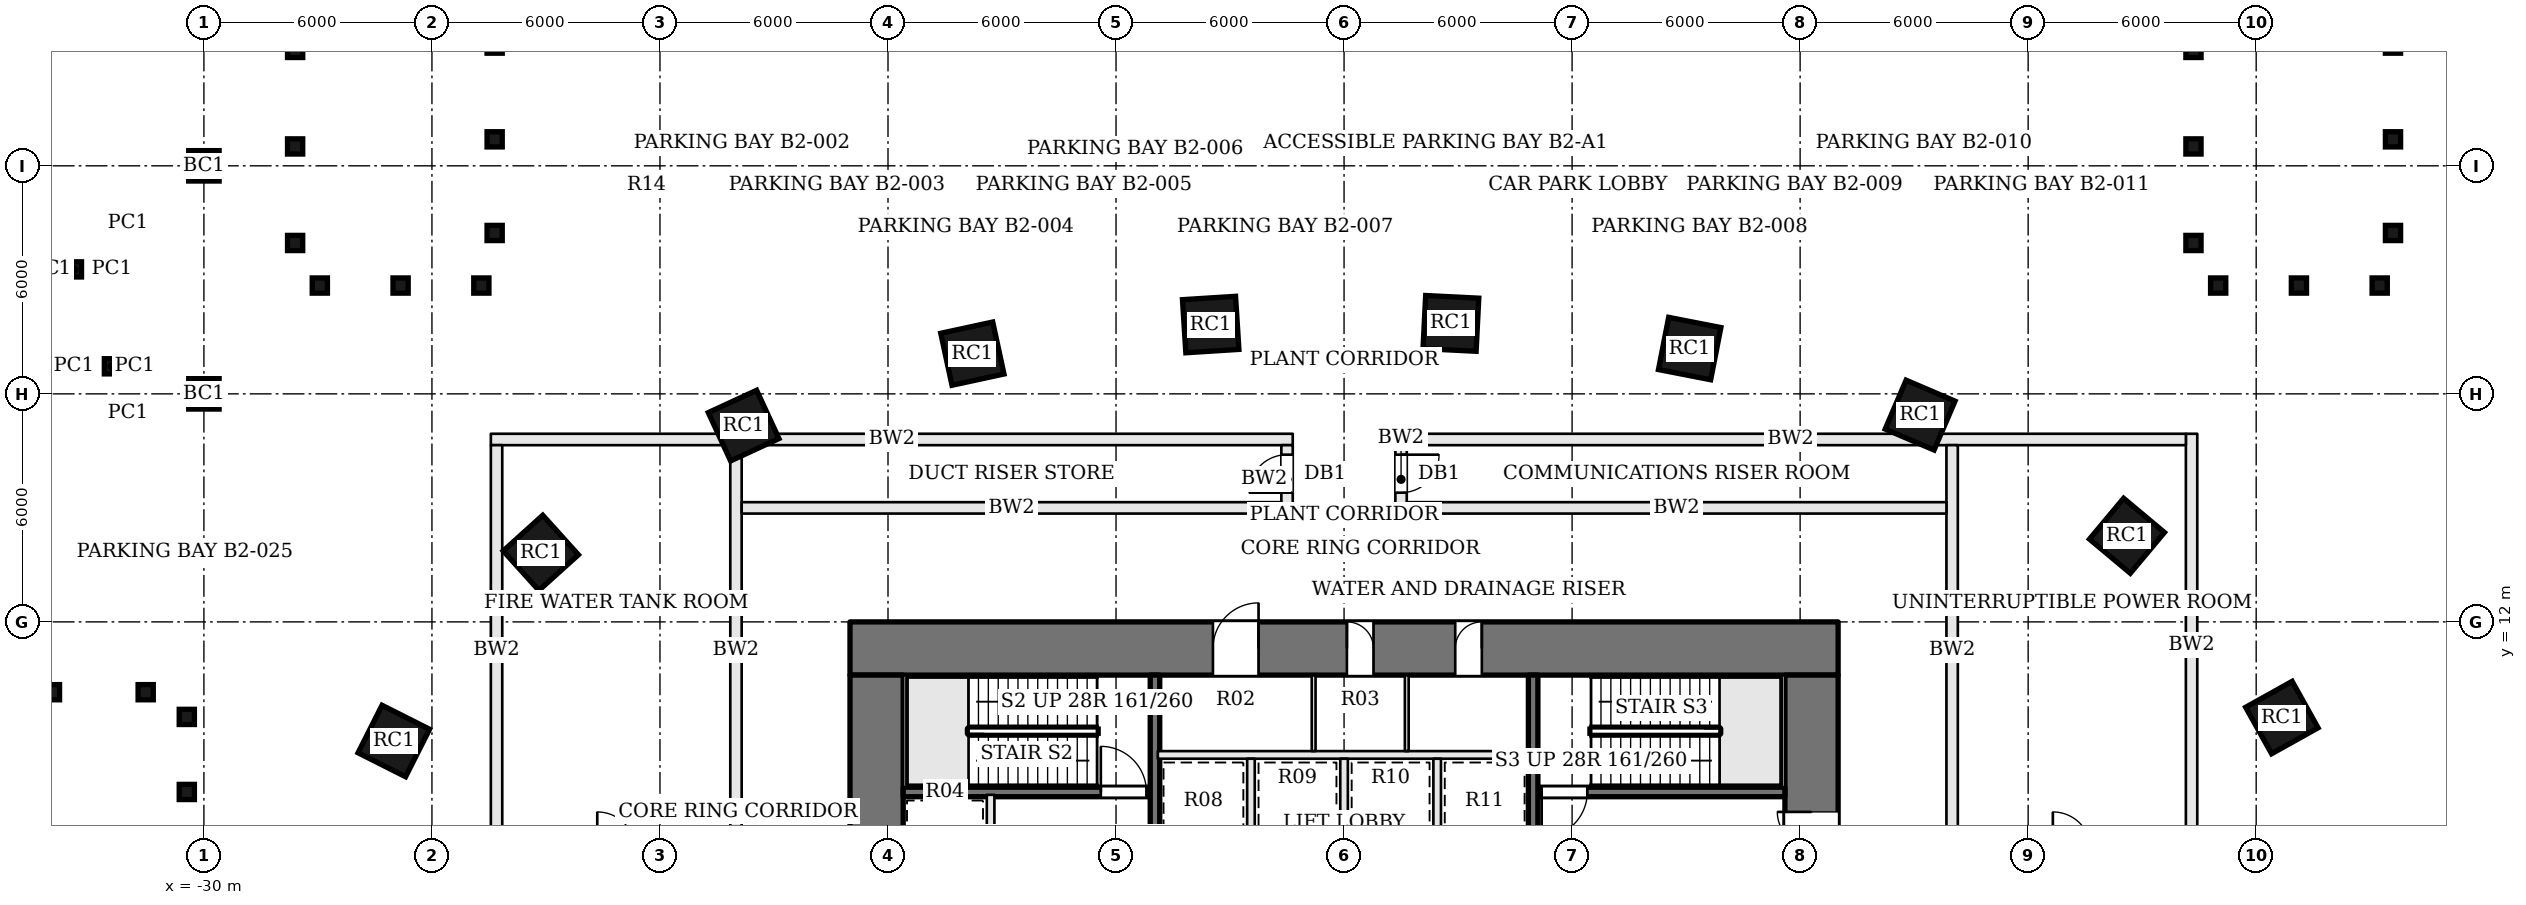
"""IFC4 building model, lengths in metres.
Left out: names, types, materials, properties, quantities, classifications, styles, units other than length and angle.
Written with IfcOpenShell. Run it as: python <this file> out.ifc"""

import sys

from ifc_helpers import new_model, si_unit, direction, frame, frame_2d, origin, origin_2d, place, context, subcontext, project, spatial, rectangle, extrude, element, fill, save


model = new_model("IFC4")
c1 = context("Model", 3, precision=1e-05, world=origin(), true_north=direction((0.0, 1.0)))
c2 = subcontext(c1, "Body", "Model", "MODEL_VIEW")
j1 = project(units=[si_unit("LENGTHUNIT", "METRE"), si_unit("PLANEANGLEUNIT", "RADIAN")], contexts=[c1])
p1 = place(None, origin())
s1 = spatial("IfcSite", under=j1, at=p1, CompositionType="ELEMENT")
p2 = place(p1, origin())
s2 = spatial("IfcBuilding", under=s1, at=p2, CompositionType="ELEMENT")
p3 = place(p2, frame((0.0, 0.0, -10.5)))
s3 = spatial("IfcBuildingStorey", under=s2, at=p3, CompositionType="ELEMENT", Elevation=-10.5)
for number, where, z_axis, x_axis in (
    (1, (-30.0, 18.0, 0.0), (0.0, 0.0, 1.0), (1.0, 0.0, 0.0)),
    (2, (-30.0, 24.0, 0.0), (0.0, 0.0, 1.0), (1.0, 0.0, 0.0)),
):
    element("IfcColumn", number, at=place(p3, frame(where, z_axis=z_axis, x_axis=x_axis)), inside=s3, PredefinedType="COLUMN", context=c2, shape_type="SweptSolid", body=[
        extrude(rectangle(XDim=0.8, YDim=0.8, at=origin_2d()), origin(), (0.0, 0.0, 1.0), 4.5),
    ])
p4 = place(p3, frame((-13.0, 11.3, 0.0), z_axis=(0.0, 0.0, 1.0), x_axis=(1.0, 0.0, 0.0)))
e3 = element("IfcWall", 3, at=p4, inside=s3, PredefinedType="SHEAR", context=c2, shape_type="SweptSolid", body=[
    extrude(rectangle(XDim=26.0, YDim=1.4, at=frame_2d((13.0, 0.0))), origin(), (0.0, 0.0, 1.0), 4.5),
])
p5 = place(p4, frame((9.55, 0.0, 0.0)))
e4 = element("IfcOpeningElement", 4, at=p5, cuts=e3, PredefinedType="OPENING", context=c2, shape_type="SweptSolid", body=[
    extrude(rectangle(XDim=1.2, YDim=2.1, at=frame_2d((0.6, 1.05))), frame((0.0, 0.71, 0.0), z_axis=(0.0, -1.0, 0.0), x_axis=(1.0, 0.0, 0.0)), (0.0, 0.0, 1.0), 1.42),
])
p6 = place(p4, frame((13.075, 0.0, 0.0)))
e5 = element("IfcOpeningElement", 5, at=p6, cuts=e3, PredefinedType="OPENING", context=c2, shape_type="SweptSolid", body=[
    extrude(rectangle(XDim=0.7, YDim=2.1, at=frame_2d((0.35, 1.05))), frame((0.0, 0.71, 0.0), z_axis=(0.0, -1.0, 0.0), x_axis=(1.0, 0.0, 0.0)), (0.0, 0.0, 1.0), 1.42),
])
p7 = place(p4, frame((15.925, 0.0, 0.0)))
e6 = element("IfcOpeningElement", 6, at=p7, cuts=e3, PredefinedType="OPENING", context=c2, shape_type="SweptSolid", body=[
    extrude(rectangle(XDim=0.7, YDim=2.1, at=frame_2d((0.35, 1.05))), frame((0.0, 0.71, 0.0), z_axis=(0.0, -1.0, 0.0), x_axis=(1.0, 0.0, 0.0)), (0.0, 0.0, 1.0), 1.42),
])
p8 = place(p3, frame((12.3, -1.6, 0.0), z_axis=(0.0, 0.0, 1.0), x_axis=(0.0, 1.0, 0.0)))
e7 = element("IfcWall", 7, at=p8, inside=s3, PredefinedType="SHEAR", context=c2, shape_type="SweptSolid", body=[
    extrude(rectangle(XDim=12.2, YDim=1.4, at=frame_2d((6.1, 0.0))), origin(), (0.0, 0.0, 1.0), 4.5),
])
p9 = place(p8, frame((6.8, 0.0, 0.0)))
e8 = element("IfcOpeningElement", 8, at=p9, cuts=e7, PredefinedType="OPENING", context=c2, shape_type="SweptSolid", body=[
    extrude(rectangle(XDim=1.8, YDim=2.1, at=frame_2d((0.9, 1.05))), frame((0.0, 0.71, 0.0), z_axis=(0.0, -1.0, 0.0), x_axis=(1.0, 0.0, 0.0)), (0.0, 0.0, 1.0), 1.42),
])
p10 = place(p3, frame((-12.3, -1.6, 0.0), z_axis=(0.0, 0.0, 1.0), x_axis=(0.0, 1.0, 0.0)))
e9 = element("IfcWall", 9, at=p10, inside=s3, PredefinedType="SHEAR", context=c2, shape_type="SweptSolid", body=[
    extrude(rectangle(XDim=12.2, YDim=1.4, at=frame_2d((6.1, 0.0))), origin(), (0.0, 0.0, 1.0), 4.5),
])
p11 = place(p10, frame((3.6, 0.0, 0.0)))
e10 = element("IfcOpeningElement", 10, at=p11, cuts=e9, PredefinedType="OPENING", context=c2, shape_type="SweptSolid", body=[
    extrude(rectangle(XDim=1.8, YDim=2.1, at=frame_2d((0.9, 1.05))), frame((0.0, 0.71, 0.0), z_axis=(0.0, -1.0, 0.0), x_axis=(1.0, 0.0, 0.0)), (0.0, 0.0, 1.0), 1.42),
])
for number, where, z_axis, x_axis in (
    (11, (24.676, 9.483, 0.0), (0.0, 0.0, 1.0), (-0.487, 0.873, 0.0)),
    (12, (20.6, 14.266, 0.0), (0.0, 0.0, 1.0), (-0.767, 0.641, 0.0)),
    (13, (15.157, 17.441, 0.0), (0.0, 0.0, 1.0), (-0.919, 0.394, 0.0)),
    (14, (9.094, 19.192, 0.0), (0.0, 0.0, 1.0), (-0.981, 0.192, 0.0)),
    (15, (2.811, 19.854, 0.0), (0.0, 0.0, 1.0), (-0.999, 0.05, 0.0)),
    (16, (-3.509, 19.824, 0.0), (0.0, 0.0, 1.0), (-0.998, -0.063, 0.0)),
    (17, (-9.78, 19.058, 0.0), (0.0, 0.0, 1.0), (-0.977, -0.211, 0.0)),
    (18, (-15.799, 17.165, 0.0), (0.0, 0.0, 1.0), (-0.908, -0.419, 0.0)),
    (19, (-21.135, 13.817, 0.0), (0.0, 0.0, 1.0), (-0.743, -0.67, 0.0)),
    (20, (-25.003, 8.866, 0.0), (0.0, 0.0, 1.0), (-0.45, -0.893, 0.0)),
):
    element("IfcColumn", number, at=place(p3, frame(where, z_axis=z_axis, x_axis=x_axis)), inside=s3, PredefinedType="COLUMN", context=c2, shape_type="SweptSolid", body=[
        extrude(rectangle(XDim=1.4, YDim=1.4, at=origin_2d()), origin(), (0.0, 0.0, 1.0), 4.5),
    ])
for number, where, z_axis, x_axis in (
    (21, (-32.0, 17.5, 0.0), (0.0, 0.0, 1.0), (1.0, 0.0, 0.0)),
    (22, (-32.0, 22.5, 0.0), (0.0, 0.0, 1.0), (1.0, 0.0, 0.0)),
    (23, (-33.42, 18.725, 0.0), (0.0, 0.0, 1.0), (1.0, 0.0, 0.0)),
    (24, (-32.42, 18.725, 0.0), (0.0, 0.0, 1.0), (1.0, 0.0, 0.0)),
    (25, (-32.42, 21.275, 0.0), (0.0, 0.0, 1.0), (1.0, 0.0, 0.0)),
    (26, (-33.42, 21.275, 0.0), (0.0, 0.0, 1.0), (1.0, 0.0, 0.0)),
):
    element("IfcColumn", number, at=place(p3, frame(where, z_axis=z_axis, x_axis=x_axis)), inside=s3, PredefinedType="COLUMN", context=c2, shape_type="SweptSolid", body=[
        extrude(rectangle(XDim=0.4, YDim=0.4, at=origin_2d()), origin(), (0.0, 0.0, 1.0), 4.5),
    ])
p12 = place(p3, frame((11.6, 7.525, 0.0), z_axis=(0.0, 0.0, 1.0), x_axis=(-1.0, 0.0, 0.0)))
e27 = element("IfcWall", 27, at=p12, inside=s3, PredefinedType="SOLIDWALL", context=c2, shape_type="SweptSolid", body=[
    extrude(rectangle(XDim=6.5, YDim=0.25, at=frame_2d((3.25, 0.0))), origin(), (0.0, 0.0, 1.0), 4.2),
])
p13 = place(p12, frame((5.2, 0.0, 0.0)))
e28 = element("IfcOpeningElement", 28, at=p13, cuts=e27, PredefinedType="OPENING", context=c2, shape_type="SweptSolid", body=[
    extrude(rectangle(XDim=1.2, YDim=2.1, at=frame_2d((0.6, 1.05))), frame((0.0, 0.135, 0.0), z_axis=(0.0, -1.0, 0.0), x_axis=(1.0, 0.0, 0.0)), (0.0, 0.0, 1.0), 0.27),
])
p14 = place(p3, frame((-11.6, 7.525, 0.0), z_axis=(0.0, 0.0, 1.0), x_axis=(1.0, 0.0, 0.0)))
e29 = element("IfcWall", 29, at=p14, inside=s3, PredefinedType="SOLIDWALL", context=c2, shape_type="SweptSolid", body=[
    extrude(rectangle(XDim=6.5, YDim=0.25, at=frame_2d((3.25, 0.0))), origin(), (0.0, 0.0, 1.0), 4.2),
])
p15 = place(p14, frame((5.2, 0.0, 0.0)))
e30 = element("IfcOpeningElement", 30, at=p15, cuts=e29, PredefinedType="OPENING", context=c2, shape_type="SweptSolid", body=[
    extrude(rectangle(XDim=1.2, YDim=2.1, at=frame_2d((0.6, 1.05))), frame((0.0, 0.135, 0.0), z_axis=(0.0, -1.0, 0.0), x_axis=(1.0, 0.0, 0.0)), (0.0, 0.0, 1.0), 0.27),
])
p16 = place(p3, frame((-9.3, 4.45, 0.0), z_axis=(0.0, 0.0, 1.0), x_axis=(0.0, 1.0, 0.0)))
e31 = element("IfcWall", 31, at=p16, inside=s3, PredefinedType="SOLIDWALL", context=c2, shape_type="SweptSolid", body=[
    extrude(rectangle(XDim=3.0, YDim=0.2, at=frame_2d((1.5, 0.0))), origin(), (0.0, 0.0, 1.0), 4.2),
])
p17 = place(p3, frame((-4.975, -1.6, 0.0), z_axis=(0.0, 0.0, 1.0), x_axis=(0.0, 1.0, 0.0)))
e32 = element("IfcWall", 32, at=p17, inside=s3, PredefinedType="SOLIDWALL", context=c2, shape_type="SweptSolid", body=[
    extrude(rectangle(XDim=12.2, YDim=0.25, at=frame_2d((6.1, 0.0))), origin(), (0.0, 0.0, 1.0), 4.2),
])
p18 = place(p17, frame((4.65, 0.0, 0.0)))
e33 = element("IfcOpeningElement", 33, at=p18, cuts=e32, PredefinedType="OPENING", context=c2, shape_type="SweptSolid", body=[
    extrude(rectangle(XDim=1.2, YDim=2.1, at=frame_2d((0.6, 1.05))), frame((0.0, 0.135, 0.0), z_axis=(0.0, -1.0, 0.0), x_axis=(1.0, 0.0, 0.0)), (0.0, 0.0, 1.0), 0.27),
])
p19 = place(p3, frame((4.975, 10.6, 0.0), z_axis=(0.0, 0.0, 1.0), x_axis=(0.0, -1.0, 0.0)))
e34 = element("IfcWall", 34, at=p19, inside=s3, PredefinedType="SOLIDWALL", context=c2, shape_type="SweptSolid", body=[
    extrude(rectangle(XDim=12.2, YDim=0.25, at=frame_2d((6.1, 0.0))), origin(), (0.0, 0.0, 1.0), 4.2),
])
p20 = place(p19, frame((4.65, 0.0, 0.0)))
e35 = element("IfcOpeningElement", 35, at=p20, cuts=e34, PredefinedType="OPENING", context=c2, shape_type="SweptSolid", body=[
    extrude(rectangle(XDim=1.2, YDim=2.1, at=frame_2d((0.6, 1.05))), frame((0.0, 0.135, 0.0), z_axis=(0.0, -1.0, 0.0), x_axis=(1.0, 0.0, 0.0)), (0.0, 0.0, 1.0), 0.27),
])
p21 = place(p3, frame((-4.9, 8.5, 0.0), z_axis=(0.0, 0.0, 1.0), x_axis=(1.0, 0.0, 0.0)))
e36 = element("IfcWall", 36, at=p21, inside=s3, PredefinedType="SOLIDWALL", context=c2, shape_type="SweptSolid", body=[
    extrude(rectangle(XDim=9.8, YDim=0.2, at=frame_2d((4.9, 0.0))), origin(), (0.0, 0.0, 1.0), 4.2),
])
for number, where, z_axis, x_axis in (
    (37, (-2.45, 6.2, 0.0), (0.0, 0.0, 1.0), (0.0, 1.0, 0.0)),
    (38, (0.0, 6.2, 0.0), (0.0, 0.0, 1.0), (0.0, 1.0, 0.0)),
    (39, (2.45, 6.2, 0.0), (0.0, 0.0, 1.0), (0.0, 1.0, 0.0)),
):
    element("IfcWall", number, at=place(p3, frame(where, z_axis=z_axis, x_axis=x_axis)), inside=s3, PredefinedType="SOLIDWALL", context=c2, shape_type="SweptSolid", body=[
        extrude(rectangle(XDim=2.2, YDim=0.2, at=frame_2d((1.1, 0.0))), origin(), (0.0, 0.0, 1.0), 4.2),
    ])
for number, where, z_axis, x_axis in (
    (40, (-0.8, 8.6, 0.0), (0.0, 0.0, 1.0), (0.0, 1.0, 0.0)),
    (41, (1.65, 8.6, 0.0), (0.0, 0.0, 1.0), (0.0, 1.0, 0.0)),
):
    element("IfcWall", number, at=place(p3, frame(where, z_axis=z_axis, x_axis=x_axis)), inside=s3, PredefinedType="PARTITIONING", context=c2, shape_type="SweptSolid", body=[
        extrude(rectangle(XDim=2.0, YDim=0.1, at=frame_2d((1.0, 0.0))), origin(), (0.0, 0.0, 1.0), 4.2),
    ])
p22 = place(p3, frame((-16.0, 5.85, 0.0), z_axis=(0.0, 0.0, 1.0), x_axis=(0.0, 1.0, 0.0)))
e42 = element("IfcWall", 42, at=p22, inside=s3, PredefinedType="SOLIDWALL", context=c2, shape_type="SweptSolid", body=[
    extrude(rectangle(XDim=10.8, YDim=0.3, at=frame_2d((5.4, 0.0))), origin(), (0.0, 0.0, 1.0), 3.48),
])
p23 = place(p3, frame((-1.35, 16.8, 0.0), z_axis=(0.0, 0.0, 1.0), x_axis=(-1.0, 0.0, 0.0)))
e43 = element("IfcWall", 43, at=p23, inside=s3, PredefinedType="SOLIDWALL", context=c2, shape_type="SweptSolid", body=[
    extrude(rectangle(XDim=21.1, YDim=0.3, at=frame_2d((10.55, 0.0))), origin(), (0.0, 0.0, 1.0), 3.48),
])
p24 = place(p3, frame((-22.3, 16.65, 0.0), z_axis=(0.0, 0.0, 1.0), x_axis=(0.0, -1.0, 0.0)))
e44 = element("IfcWall", 44, at=p24, inside=s3, PredefinedType="SOLIDWALL", context=c2, shape_type="SweptSolid", body=[
    extrude(rectangle(XDim=10.8, YDim=0.3, at=frame_2d((5.4, 0.0))), origin(), (0.0, 0.0, 1.0), 3.48),
])
p25 = place(p3, frame((22.3, 5.85, 0.0), z_axis=(0.0, 0.0, 1.0), x_axis=(0.0, 1.0, 0.0)))
e45 = element("IfcWall", 45, at=p25, inside=s3, PredefinedType="SOLIDWALL", context=c2, shape_type="SweptSolid", body=[
    extrude(rectangle(XDim=11.1, YDim=0.3, at=frame_2d((5.55, 0.0))), origin(), (0.0, 0.0, 1.0), 3.48),
])
p26 = place(p3, frame((22.15, 16.8, 0.0), z_axis=(0.0, 0.0, 1.0), x_axis=(-1.0, 0.0, 0.0)))
e46 = element("IfcWall", 46, at=p26, inside=s3, PredefinedType="SOLIDWALL", context=c2, shape_type="SweptSolid", body=[
    extrude(rectangle(XDim=20.8, YDim=0.3, at=frame_2d((10.4, 0.0))), origin(), (0.0, 0.0, 1.0), 3.48),
])
p27 = place(p3, frame((16.0, 16.65, 0.0), z_axis=(0.0, 0.0, 1.0), x_axis=(0.0, -1.0, 0.0)))
e47 = element("IfcWall", 47, at=p27, inside=s3, PredefinedType="SOLIDWALL", context=c2, shape_type="SweptSolid", body=[
    extrude(rectangle(XDim=10.8, YDim=0.3, at=frame_2d((5.4, 0.0))), origin(), (0.0, 0.0, 1.0), 3.48),
])
p28 = place(p3, frame((-1.5, 14.85, 0.0), z_axis=(0.0, 0.0, 1.0), x_axis=(0.0, 1.0, 0.0)))
e48 = element("IfcWall", 48, at=p28, inside=s3, PredefinedType="SOLIDWALL", context=c2, shape_type="SweptSolid", body=[
    extrude(rectangle(XDim=1.8, YDim=0.3, at=frame_2d((0.9, 0.0))), origin(), (0.0, 0.0, 1.0), 3.48),
])
p29 = place(p28, frame((0.55, 0.0, 0.0)))
e49 = element("IfcOpeningElement", 49, at=p29, cuts=e48, PredefinedType="OPENING", context=c2, shape_type="SweptSolid", body=[
    extrude(rectangle(XDim=1.0, YDim=2.1, at=frame_2d((0.5, 1.05))), frame((0.0, 0.16, 0.0), z_axis=(0.0, -1.0, 0.0), x_axis=(1.0, 0.0, 0.0)), (0.0, 0.0, 1.0), 0.32),
])
p30 = place(p3, frame((-15.85, 15.0, 0.0), z_axis=(0.0, 0.0, 1.0), x_axis=(1.0, 0.0, 0.0)))
e50 = element("IfcWall", 50, at=p30, inside=s3, PredefinedType="SOLIDWALL", context=c2, shape_type="SweptSolid", body=[
    extrude(rectangle(XDim=14.2, YDim=0.3, at=frame_2d((7.1, 0.0))), origin(), (0.0, 0.0, 1.0), 3.48),
])
p31 = place(p3, frame((1.5, 16.65, 0.0), z_axis=(0.0, 0.0, 1.0), x_axis=(0.0, -1.0, 0.0)))
e51 = element("IfcWall", 51, at=p31, inside=s3, PredefinedType="SOLIDWALL", context=c2, shape_type="SweptSolid", body=[
    extrude(rectangle(XDim=1.8, YDim=0.3, at=frame_2d((0.9, 0.0))), origin(), (0.0, 0.0, 1.0), 3.48),
])
p32 = place(p31, frame((0.25, 0.0, 0.0)))
e52 = element("IfcOpeningElement", 52, at=p32, cuts=e51, PredefinedType="OPENING", context=c2, shape_type="SweptSolid", body=[
    extrude(rectangle(XDim=1.0, YDim=2.1, at=frame_2d((0.5, 1.05))), frame((0.0, 0.16, 0.0), z_axis=(0.0, -1.0, 0.0), x_axis=(1.0, 0.0, 0.0)), (0.0, 0.0, 1.0), 0.32),
])
p33 = place(p3, frame((1.65, 15.0, 0.0), z_axis=(0.0, 0.0, 1.0), x_axis=(1.0, 0.0, 0.0)))
e53 = element("IfcWall", 53, at=p33, inside=s3, PredefinedType="SOLIDWALL", context=c2, shape_type="SweptSolid", body=[
    extrude(rectangle(XDim=14.2, YDim=0.3, at=frame_2d((7.1, 0.0))), origin(), (0.0, 0.0, 1.0), 3.48),
])
for number, where, z_axis, x_axis in (
    (54, (-27.6, 27.05, 0.0), (0.0, 0.0, 1.0), (1.0, 0.0, 0.0)),
    (55, (-27.6, 24.51, 0.0), (0.0, 0.0, 1.0), (1.0, 0.0, 0.0)),
    (56, (-27.6, 21.97, 0.0), (0.0, 0.0, 1.0), (1.0, 0.0, 0.0)),
    (57, (-26.95, 20.85, 0.0), (0.0, 0.0, 1.0), (1.0, 0.0, 0.0)),
    (58, (-22.7, 20.85, 0.0), (0.0, 0.0, 1.0), (1.0, 0.0, 0.0)),
    (59, (-24.825, 20.85, 0.0), (0.0, 0.0, 1.0), (1.0, 0.0, 0.0)),
    (60, (-22.35, 22.233, 0.0), (0.0, 0.0, 1.0), (1.0, 0.0, 0.0)),
    (61, (-22.35, 24.697, 0.0), (0.0, 0.0, 1.0), (1.0, 0.0, 0.0)),
    (62, (-22.35, 27.163, 0.0), (0.0, 0.0, 1.0), (1.0, 0.0, 0.0)),
    (63, (22.35, 27.05, 0.0), (0.0, 0.0, 1.0), (1.0, 0.0, 0.0)),
    (64, (22.35, 24.51, 0.0), (0.0, 0.0, 1.0), (1.0, 0.0, 0.0)),
    (65, (22.35, 21.97, 0.0), (0.0, 0.0, 1.0), (1.0, 0.0, 0.0)),
    (66, (23.0, 20.85, 0.0), (0.0, 0.0, 1.0), (1.0, 0.0, 0.0)),
    (67, (27.25, 20.85, 0.0), (0.0, 0.0, 1.0), (1.0, 0.0, 0.0)),
    (68, (25.125, 20.85, 0.0), (0.0, 0.0, 1.0), (1.0, 0.0, 0.0)),
    (69, (27.6, 22.233, 0.0), (0.0, 0.0, 1.0), (1.0, 0.0, 0.0)),
    (70, (27.6, 24.697, 0.0), (0.0, 0.0, 1.0), (1.0, 0.0, 0.0)),
    (71, (27.6, 27.163, 0.0), (0.0, 0.0, 1.0), (1.0, 0.0, 0.0)),
    (72, (-33.998, 10.15, 0.0), (0.0, 0.0, 1.0), (1.0, 0.0, 0.0)),
    (73, (-31.532, 10.15, 0.0), (0.0, 0.0, 1.0), (1.0, 0.0, 0.0)),
    (74, (-30.45, 9.5, 0.0), (0.0, 0.0, 1.0), (1.0, 0.0, 0.0)),
    (75, (-30.45, 7.525, 0.0), (0.0, 0.0, 1.0), (1.0, 0.0, 0.0)),
):
    element("IfcColumn", number, at=place(p3, frame(where, z_axis=z_axis, x_axis=x_axis)), inside=s3, PredefinedType="COLUMN", context=c2, shape_type="SweptSolid", body=[
        extrude(rectangle(XDim=0.4, YDim=0.4, at=origin_2d()), origin(), (0.0, 0.0, 1.0), 4.5),
    ])
p34 = place(p9, origin())
e76 = element("IfcDoor", 76, at=p34, inside=s3, OperationType="DOUBLE_DOOR_SINGLE_SWING", PredefinedType="DOOR", context=c2, shape_type="SweptSolid", body=[
    extrude(rectangle(XDim=1.8, YDim=2.1, at=frame_2d((0.9, 1.05))), frame((0.0, 0.025, 0.0), z_axis=(0.0, -1.0, 0.0), x_axis=(1.0, 0.0, 0.0)), (0.0, 0.0, 1.0), 0.05),
])
fill(e8, e76)
p35 = place(p13, origin())
e77 = element("IfcDoor", 77, at=p35, inside=s3, OperationType="SINGLE_SWING_RIGHT", PredefinedType="DOOR", context=c2, shape_type="SweptSolid", body=[
    extrude(rectangle(XDim=1.2, YDim=2.1, at=frame_2d((0.6, 1.05))), frame((0.0, 0.025, 0.0), z_axis=(0.0, -1.0, 0.0), x_axis=(1.0, 0.0, 0.0)), (0.0, 0.0, 1.0), 0.05),
])
fill(e28, e77)
p36 = place(p15, origin())
e78 = element("IfcDoor", 78, at=p36, inside=s3, OperationType="SINGLE_SWING_LEFT", PredefinedType="DOOR", context=c2, shape_type="SweptSolid", body=[
    extrude(rectangle(XDim=1.2, YDim=2.1, at=frame_2d((0.6, 1.05))), frame((0.0, 0.025, 0.0), z_axis=(0.0, -1.0, 0.0), x_axis=(1.0, 0.0, 0.0)), (0.0, 0.0, 1.0), 0.05),
])
fill(e30, e78)
p37 = place(p5, origin())
e79 = element("IfcDoor", 79, at=p37, inside=s3, OperationType="SINGLE_SWING_RIGHT", PredefinedType="DOOR", context=c2, shape_type="SweptSolid", body=[
    extrude(rectangle(XDim=1.2, YDim=2.1, at=frame_2d((0.6, 1.05))), frame((0.0, 0.025, 0.0), z_axis=(0.0, -1.0, 0.0), x_axis=(1.0, 0.0, 0.0)), (0.0, 0.0, 1.0), 0.05),
])
fill(e4, e79)
p38 = place(p6, origin())
e80 = element("IfcDoor", 80, at=p38, inside=s3, OperationType="SINGLE_SWING_LEFT", PredefinedType="DOOR", context=c2, shape_type="SweptSolid", body=[
    extrude(rectangle(XDim=0.7, YDim=2.1, at=frame_2d((0.35, 1.05))), frame((0.0, 0.025, 0.0), z_axis=(0.0, -1.0, 0.0), x_axis=(1.0, 0.0, 0.0)), (0.0, 0.0, 1.0), 0.05),
])
fill(e5, e80)
p39 = place(p7, origin())
e81 = element("IfcDoor", 81, at=p39, inside=s3, OperationType="SINGLE_SWING_RIGHT", PredefinedType="DOOR", context=c2, shape_type="SweptSolid", body=[
    extrude(rectangle(XDim=0.7, YDim=2.1, at=frame_2d((0.35, 1.05))), frame((0.0, 0.025, 0.0), z_axis=(0.0, -1.0, 0.0), x_axis=(1.0, 0.0, 0.0)), (0.0, 0.0, 1.0), 0.05),
])
fill(e6, e81)
p40 = place(p29, origin())
e82 = element("IfcDoor", 82, at=p40, inside=s3, OperationType="SINGLE_SWING_LEFT", PredefinedType="DOOR", context=c2, shape_type="SweptSolid", body=[
    extrude(rectangle(XDim=1.0, YDim=2.1, at=frame_2d((0.5, 1.05))), frame((0.0, 0.025, 0.0), z_axis=(0.0, -1.0, 0.0), x_axis=(1.0, 0.0, 0.0)), (0.0, 0.0, 1.0), 0.05),
])
fill(e49, e82)
p41 = place(p32, origin())
e83 = element("IfcDoor", 83, at=p41, inside=s3, OperationType="SINGLE_SWING_LEFT", PredefinedType="DOOR", context=c2, shape_type="SweptSolid", body=[
    extrude(rectangle(XDim=1.0, YDim=2.1, at=frame_2d((0.5, 1.05))), frame((0.0, 0.025, 0.0), z_axis=(0.0, -1.0, 0.0), x_axis=(1.0, 0.0, 0.0)), (0.0, 0.0, 1.0), 0.05),
])
fill(e52, e83)
save(model, sys.argv[1])
